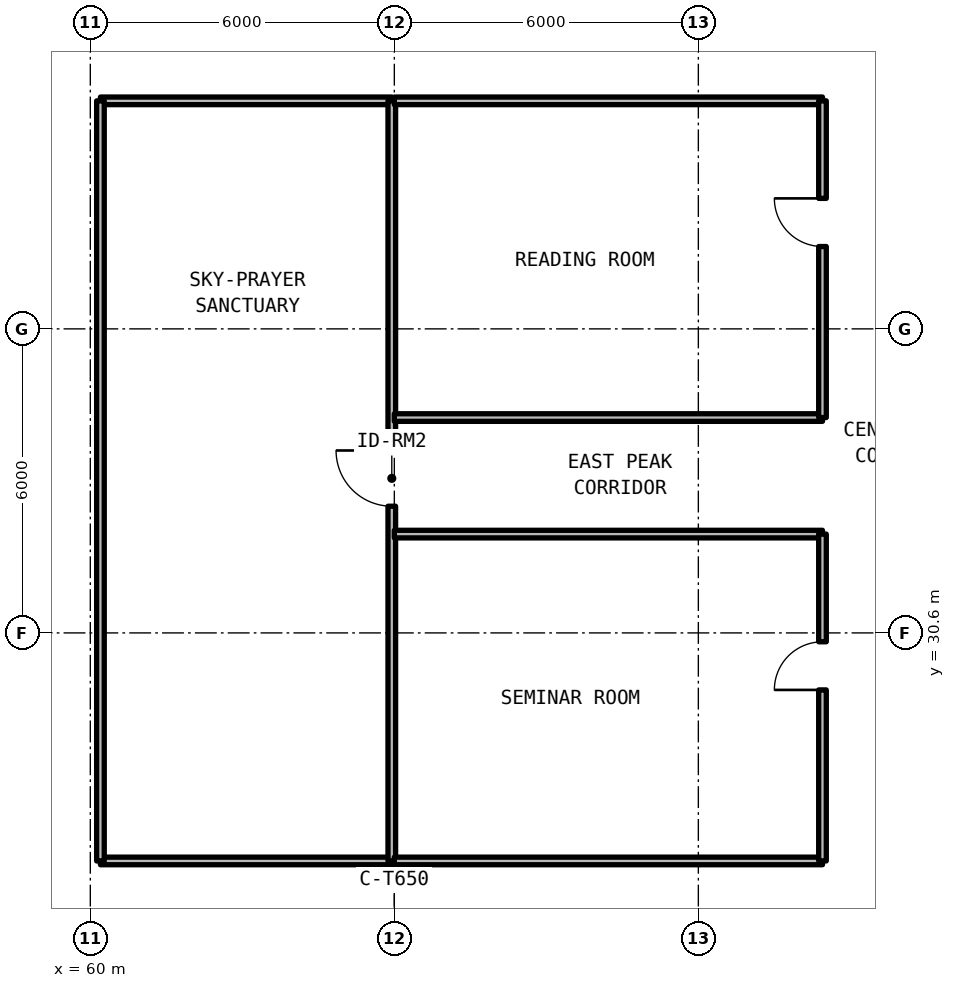
"""IFC4 building model, lengths in metres.
Left out: names, types, materials, properties, quantities, classifications, styles, units other than length and angle.
Written with IfcOpenShell. Run it as: python <this file> out.ifc"""

import sys

from ifc_helpers import new_model, si_unit, direction, frame, frame_2d, origin, place, context, subcontext, project, spatial, rectangle, extrude, element, fill, save


model = new_model("IFC4")
c1 = context("Model", 3, precision=1e-05, world=origin(), true_north=direction((0.0, 1.0)))
c2 = subcontext(c1, "Body", "Model", "MODEL_VIEW")
j1 = project(units=[si_unit("LENGTHUNIT", "METRE"), si_unit("PLANEANGLEUNIT", "RADIAN")], contexts=[c1])
p1 = place(None, origin())
s1 = spatial("IfcSite", under=j1, at=p1, CompositionType="ELEMENT")
p2 = place(p1, origin())
s2 = spatial("IfcBuilding", under=s1, at=p2, CompositionType="ELEMENT")
p3 = place(p2, frame((0.0, 0.0, 249.81)))
s3 = spatial("IfcBuildingStorey", under=s2, at=p3, CompositionType="ELEMENT", Elevation=249.81)
for number, where, z_axis, x_axis in (
    (1, (60.2, 26.1, 0.0), (0.0, 0.0, 1.0), (1.0, 0.0, 0.0)),
    (2, (60.2, 41.1, 0.0), (0.0, 0.0, 1.0), (1.0, 0.0, 0.0)),
):
    element("IfcWall", number, at=place(p3, frame(where, z_axis=z_axis, x_axis=x_axis)), inside=s3, PredefinedType="SOLIDWALL", context=c2, shape_type="SweptSolid", body=[
        extrude(rectangle(XDim=5.75, YDim=0.15, at=frame_2d((2.875, 0.0))), origin(), (0.0, 0.0, 1.0), 2.63),
    ])
p4 = place(p3, frame((60.2, 26.1, 0.0), z_axis=(0.0, 0.0, 1.0), x_axis=(0.0, 1.0, 0.0)))
e3 = element("IfcWall", 3, at=p4, inside=s3, PredefinedType="SOLIDWALL", context=c2, shape_type="SweptSolid", body=[
    extrude(rectangle(XDim=15.0, YDim=0.15, at=frame_2d((7.5, 0.0))), origin(), (0.0, 0.0, 1.0), 2.63),
])
p5 = place(p3, frame((65.95, 26.1, 0.0), z_axis=(0.0, 0.0, 1.0), x_axis=(0.0, 1.0, 0.0)))
e4 = element("IfcWall", 4, at=p5, inside=s3, PredefinedType="SOLIDWALL", context=c2, shape_type="SweptSolid", body=[
    extrude(rectangle(XDim=15.0, YDim=0.15, at=frame_2d((7.5, 0.0))), origin(), (0.0, 0.0, 1.0), 2.63),
])
p6 = place(p5, frame((7.0, 0.0, 0.0)))
e5 = element("IfcOpeningElement", 5, at=p6, cuts=e4, PredefinedType="OPENING", context=c2, shape_type="SweptSolid", body=[
    extrude(rectangle(XDim=1.1, YDim=2.15, at=frame_2d((0.55, 1.075))), frame((0.0, 0.085, 0.0), z_axis=(0.0, -1.0, 0.0), x_axis=(1.0, 0.0, 0.0)), (0.0, 0.0, 1.0), 0.17),
])
for number, where, z_axis, x_axis in (
    (6, (66.0, 26.1, 0.0), (0.0, 0.0, 1.0), (1.0, 0.0, 0.0)),
    (7, (66.0, 32.55, 0.0), (0.0, 0.0, 1.0), (1.0, 0.0, 0.0)),
):
    element("IfcWall", number, at=place(p3, frame(where, z_axis=z_axis, x_axis=x_axis)), inside=s3, PredefinedType="SOLIDWALL", context=c2, shape_type="SweptSolid", body=[
        extrude(rectangle(XDim=8.45, YDim=0.15, at=frame_2d((4.225, 0.0))), origin(), (0.0, 0.0, 1.0), 2.63),
    ])
p7 = place(p3, frame((74.45, 26.1, 0.0), z_axis=(0.0, 0.0, 1.0), x_axis=(0.0, 1.0, 0.0)))
e8 = element("IfcWall", 8, at=p7, inside=s3, PredefinedType="SOLIDWALL", context=c2, shape_type="SweptSolid", body=[
    extrude(rectangle(XDim=6.45, YDim=0.15, at=frame_2d((3.225, 0.0))), origin(), (0.0, 0.0, 1.0), 2.63),
])
p8 = place(p7, frame((3.375, 0.0, 0.0)))
e9 = element("IfcOpeningElement", 9, at=p8, cuts=e8, PredefinedType="OPENING", context=c2, shape_type="SweptSolid", body=[
    extrude(rectangle(XDim=0.95, YDim=2.15, at=frame_2d((0.475, 1.075))), frame((0.0, 0.085, 0.0), z_axis=(0.0, -1.0, 0.0), x_axis=(1.0, 0.0, 0.0)), (0.0, 0.0, 1.0), 0.17),
])
for number, where, z_axis, x_axis in (
    (10, (66.0, 34.85, 0.0), (0.0, 0.0, 1.0), (1.0, 0.0, 0.0)),
    (11, (66.0, 41.1, 0.0), (0.0, 0.0, 1.0), (1.0, 0.0, 0.0)),
):
    element("IfcWall", number, at=place(p3, frame(where, z_axis=z_axis, x_axis=x_axis)), inside=s3, PredefinedType="SOLIDWALL", context=c2, shape_type="SweptSolid", body=[
        extrude(rectangle(XDim=8.45, YDim=0.15, at=frame_2d((4.225, 0.0))), origin(), (0.0, 0.0, 1.0), 2.63),
    ])
p9 = place(p3, frame((74.45, 34.85, 0.0), z_axis=(0.0, 0.0, 1.0), x_axis=(0.0, 1.0, 0.0)))
e12 = element("IfcWall", 12, at=p9, inside=s3, PredefinedType="SOLIDWALL", context=c2, shape_type="SweptSolid", body=[
    extrude(rectangle(XDim=6.25, YDim=0.15, at=frame_2d((3.125, 0.0))), origin(), (0.0, 0.0, 1.0), 2.63),
])
p10 = place(p9, frame((3.375, 0.0, 0.0)))
e13 = element("IfcOpeningElement", 13, at=p10, cuts=e12, PredefinedType="OPENING", context=c2, shape_type="SweptSolid", body=[
    extrude(rectangle(XDim=0.95, YDim=2.15, at=frame_2d((0.475, 1.075))), frame((0.0, 0.085, 0.0), z_axis=(0.0, -1.0, 0.0), x_axis=(1.0, 0.0, 0.0)), (0.0, 0.0, 1.0), 0.17),
])
p11 = place(p6, origin())
e14 = element("IfcDoor", 14, at=p11, inside=s3, OperationType="SINGLE_SWING_RIGHT", PredefinedType="DOOR", context=c2, shape_type="SweptSolid", body=[
    extrude(rectangle(XDim=1.1, YDim=2.15, at=frame_2d((0.55, 1.075))), frame((0.0, 0.025, 0.0), z_axis=(0.0, -1.0, 0.0), x_axis=(1.0, 0.0, 0.0)), (0.0, 0.0, 1.0), 0.05),
])
fill(e5, e14)
p12 = place(p8, origin())
e15 = element("IfcDoor", 15, at=p12, inside=s3, OperationType="SINGLE_SWING_LEFT", PredefinedType="DOOR", context=c2, shape_type="SweptSolid", body=[
    extrude(rectangle(XDim=0.95, YDim=2.15, at=frame_2d((0.475, 1.075))), frame((0.0, 0.025, 0.0), z_axis=(0.0, -1.0, 0.0), x_axis=(1.0, 0.0, 0.0)), (0.0, 0.0, 1.0), 0.05),
])
fill(e9, e15)
p13 = place(p10, origin())
e16 = element("IfcDoor", 16, at=p13, inside=s3, OperationType="SINGLE_SWING_RIGHT", PredefinedType="DOOR", context=c2, shape_type="SweptSolid", body=[
    extrude(rectangle(XDim=0.95, YDim=2.15, at=frame_2d((0.475, 1.075))), frame((0.0, 0.025, 0.0), z_axis=(0.0, -1.0, 0.0), x_axis=(1.0, 0.0, 0.0)), (0.0, 0.0, 1.0), 0.05),
])
fill(e13, e16)
save(model, sys.argv[1])
